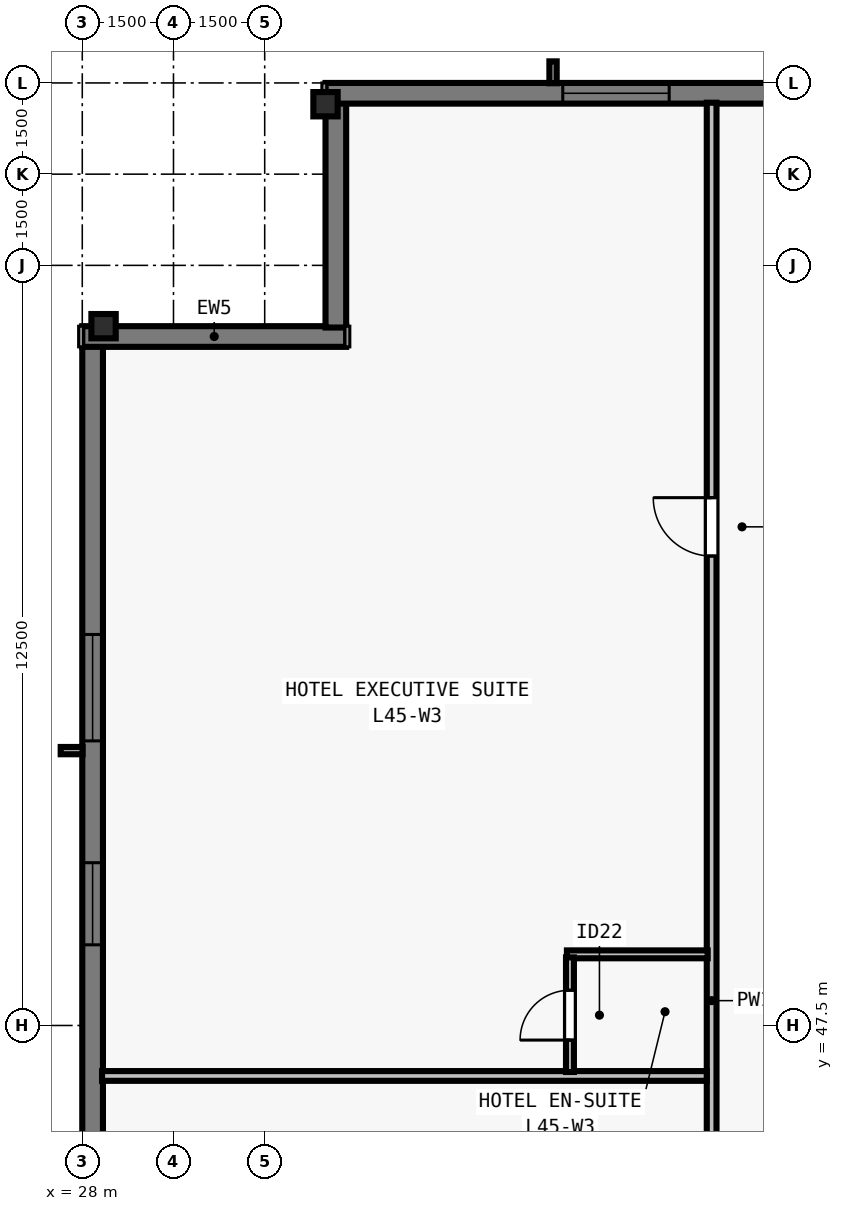
"""IFC4 building model, lengths in metres.
Left out: names, types, materials, properties, quantities, classifications, styles, units other than length and angle.
Written with IfcOpenShell. Run it as: python <this file> out.ifc"""

import sys

from ifc_helpers import new_model, si_unit, direction, frame, frame_2d, origin, origin_2d, place, context, subcontext, project, spatial, rectangle, i_section, extrude, element, fill, save


model = new_model("IFC4")
c1 = context("Model", 3, precision=1e-05, world=origin(), true_north=direction((0.0, 1.0)))
c2 = subcontext(c1, "Body", "Model", "MODEL_VIEW")
j1 = project(units=[si_unit("LENGTHUNIT", "METRE"), si_unit("PLANEANGLEUNIT", "RADIAN")], contexts=[c1])
p1 = place(None, origin())
s1 = spatial("IfcSite", under=j1, at=p1, CompositionType="ELEMENT")
p2 = place(p1, origin())
s2 = spatial("IfcBuilding", under=s1, at=p2, CompositionType="ELEMENT")
p3 = place(p2, frame((0.0, 0.0, 165.5)))
s3 = spatial("IfcBuildingStorey", under=s2, at=p3, CompositionType="ELEMENT", Elevation=165.5)
for number, where, z_axis, x_axis in (
    (1, (32.0, 62.65, 0.0), (0.0, 0.0, 1.0), (1.0, 0.0, 0.0)),
    (2, (28.35, 59.0, 0.0), (0.0, 0.0, 1.0), (0.0, 1.0, 0.0)),
):
    element("IfcColumn", number, at=place(p3, frame(where, z_axis=z_axis, x_axis=x_axis)), inside=s3, PredefinedType="COLUMN", context=c2, shape_type="SweptSolid", body=[
        extrude(i_section(OverallWidth=0.4, OverallDepth=0.4, WebThickness=0.022, FlangeThickness=0.036, at=origin_2d()), origin(), (0.0, 0.0, 1.0), 3.5),
    ])
p4 = place(p3, frame((28.17, 19.0, 0.0), z_axis=(0.0, 0.0, 1.0), x_axis=(0.0, 1.0, 0.0)))
e3 = element("IfcWall", 3, at=p4, inside=s3, PredefinedType="SOLIDWALL", context=c2, shape_type="SweptSolid", body=[
    extrude(rectangle(XDim=39.682, YDim=0.34, at=frame_2d((19.841, 0.0))), origin(), (0.0, 0.0, 1.0), 3.28),
])
p5 = place(p4, frame((4.752, 0.0, 0.8)))
e4 = element("IfcOpeningElement", 4, at=p5, cuts=e3, PredefinedType="OPENING", context=c2, shape_type="SweptSolid", body=[
    extrude(rectangle(XDim=1.75, YDim=1.66, at=frame_2d((0.875, 0.83))), frame((0.0, 0.18, 0.0), z_axis=(0.0, -1.0, 0.0), x_axis=(1.0, 0.0, 0.0)), (0.0, 0.0, 1.0), 0.36),
])
p6 = place(p4, frame((8.505, 0.0, 0.8)))
e5 = element("IfcOpeningElement", 5, at=p6, cuts=e3, PredefinedType="OPENING", context=c2, shape_type="SweptSolid", body=[
    extrude(rectangle(XDim=1.35, YDim=1.66, at=frame_2d((0.675, 0.83))), frame((0.0, 0.18, 0.0), z_axis=(0.0, -1.0, 0.0), x_axis=(1.0, 0.0, 0.0)), (0.0, 0.0, 1.0), 0.36),
])
p7 = place(p4, frame((16.062, 0.0, 0.8)))
e6 = element("IfcOpeningElement", 6, at=p7, cuts=e3, PredefinedType="OPENING", context=c2, shape_type="SweptSolid", body=[
    extrude(rectangle(XDim=1.35, YDim=1.66, at=frame_2d((0.675, 0.83))), frame((0.0, 0.18, 0.0), z_axis=(0.0, -1.0, 0.0), x_axis=(1.0, 0.0, 0.0)), (0.0, 0.0, 1.0), 0.36),
])
p8 = place(p4, frame((18.966, 0.0, 0.8)))
e7 = element("IfcOpeningElement", 7, at=p8, cuts=e3, PredefinedType="OPENING", context=c2, shape_type="SweptSolid", body=[
    extrude(rectangle(XDim=1.75, YDim=1.66, at=frame_2d((0.875, 0.83))), frame((0.0, 0.18, 0.0), z_axis=(0.0, -1.0, 0.0), x_axis=(1.0, 0.0, 0.0)), (0.0, 0.0, 1.0), 0.36),
])
p9 = place(p4, frame((22.719, 0.0, 0.8)))
e8 = element("IfcOpeningElement", 8, at=p9, cuts=e3, PredefinedType="OPENING", context=c2, shape_type="SweptSolid", body=[
    extrude(rectangle(XDim=1.35, YDim=1.66, at=frame_2d((0.675, 0.83))), frame((0.0, 0.18, 0.0), z_axis=(0.0, -1.0, 0.0), x_axis=(1.0, 0.0, 0.0)), (0.0, 0.0, 1.0), 0.36),
])
p10 = place(p4, frame((29.827, 0.0, 0.8)))
e9 = element("IfcOpeningElement", 9, at=p10, cuts=e3, PredefinedType="OPENING", context=c2, shape_type="SweptSolid", body=[
    extrude(rectangle(XDim=1.35, YDim=1.66, at=frame_2d((0.675, 0.83))), frame((0.0, 0.18, 0.0), z_axis=(0.0, -1.0, 0.0), x_axis=(1.0, 0.0, 0.0)), (0.0, 0.0, 1.0), 0.36),
])
p11 = place(p4, frame((33.18, 0.0, 0.8)))
e10 = element("IfcOpeningElement", 10, at=p11, cuts=e3, PredefinedType="OPENING", context=c2, shape_type="SweptSolid", body=[
    extrude(rectangle(XDim=1.75, YDim=1.66, at=frame_2d((0.875, 0.83))), frame((0.0, 0.18, 0.0), z_axis=(0.0, -1.0, 0.0), x_axis=(1.0, 0.0, 0.0)), (0.0, 0.0, 1.0), 0.36),
])
p12 = place(p3, frame((28.0, 58.83, 0.0), z_axis=(0.0, 0.0, 1.0), x_axis=(1.0, 0.0, 0.0)))
e11 = element("IfcWall", 11, at=p12, inside=s3, PredefinedType="SOLIDWALL", context=c2, shape_type="SweptSolid", body=[
    extrude(rectangle(XDim=4.34, YDim=0.34, at=frame_2d((2.17, 0.0))), origin(), (0.0, 0.0, 1.0), 3.28),
])
p13 = place(p3, frame((32.17, 58.978, 0.0), z_axis=(0.0, 0.0, 1.0), x_axis=(0.0, 1.0, 0.0)))
e12 = element("IfcWall", 12, at=p13, inside=s3, PredefinedType="SOLIDWALL", context=c2, shape_type="SweptSolid", body=[
    extrude(rectangle(XDim=3.704, YDim=0.34, at=frame_2d((1.852, 0.0))), origin(), (0.0, 0.0, 1.0), 3.28),
])
p14 = place(p3, frame((32.0, 62.83, 0.0), z_axis=(0.0, 0.0, 1.0), x_axis=(1.0, 0.0, 0.0)))
e13 = element("IfcWall", 13, at=p14, inside=s3, PredefinedType="SOLIDWALL", context=c2, shape_type="SweptSolid", body=[
    extrude(rectangle(XDim=39.682, YDim=0.34, at=frame_2d((19.841, 0.0))), origin(), (0.0, 0.0, 1.0), 3.28),
])
p15 = place(p14, frame((3.902, 0.0, 0.8)))
e14 = element("IfcOpeningElement", 14, at=p15, cuts=e13, PredefinedType="OPENING", context=c2, shape_type="SweptSolid", body=[
    extrude(rectangle(XDim=1.75, YDim=1.66, at=frame_2d((0.875, 0.83))), frame((0.0, 0.18, 0.0), z_axis=(0.0, -1.0, 0.0), x_axis=(1.0, 0.0, 0.0)), (0.0, 0.0, 1.0), 0.36),
])
p16 = place(p14, frame((8.955, 0.0, 0.8)))
e15 = element("IfcOpeningElement", 15, at=p16, cuts=e13, PredefinedType="OPENING", context=c2, shape_type="SweptSolid", body=[
    extrude(rectangle(XDim=1.35, YDim=1.66, at=frame_2d((0.675, 0.83))), frame((0.0, 0.18, 0.0), z_axis=(0.0, -1.0, 0.0), x_axis=(1.0, 0.0, 0.0)), (0.0, 0.0, 1.0), 0.36),
])
p17 = place(p14, frame((11.859, 0.0, 0.8)))
e16 = element("IfcOpeningElement", 16, at=p17, cuts=e13, PredefinedType="OPENING", context=c2, shape_type="SweptSolid", body=[
    extrude(rectangle(XDim=1.75, YDim=1.66, at=frame_2d((0.875, 0.83))), frame((0.0, 0.18, 0.0), z_axis=(0.0, -1.0, 0.0), x_axis=(1.0, 0.0, 0.0)), (0.0, 0.0, 1.0), 0.36),
])
p18 = place(p14, frame((16.062, 0.0, 0.8)))
e17 = element("IfcOpeningElement", 17, at=p18, cuts=e13, PredefinedType="OPENING", context=c2, shape_type="SweptSolid", body=[
    extrude(rectangle(XDim=1.35, YDim=1.66, at=frame_2d((0.675, 0.83))), frame((0.0, 0.18, 0.0), z_axis=(0.0, -1.0, 0.0), x_axis=(1.0, 0.0, 0.0)), (0.0, 0.0, 1.0), 0.36),
])
p19 = place(p14, frame((18.966, 0.0, 0.8)))
e18 = element("IfcOpeningElement", 18, at=p19, cuts=e13, PredefinedType="OPENING", context=c2, shape_type="SweptSolid", body=[
    extrude(rectangle(XDim=1.75, YDim=1.66, at=frame_2d((0.875, 0.83))), frame((0.0, 0.18, 0.0), z_axis=(0.0, -1.0, 0.0), x_axis=(1.0, 0.0, 0.0)), (0.0, 0.0, 1.0), 0.36),
])
p20 = place(p14, frame((22.719, 0.0, 0.8)))
e19 = element("IfcOpeningElement", 19, at=p20, cuts=e13, PredefinedType="OPENING", context=c2, shape_type="SweptSolid", body=[
    extrude(rectangle(XDim=1.35, YDim=1.66, at=frame_2d((0.675, 0.83))), frame((0.0, 0.18, 0.0), z_axis=(0.0, -1.0, 0.0), x_axis=(1.0, 0.0, 0.0)), (0.0, 0.0, 1.0), 0.36),
])
p21 = place(p14, frame((26.073, 0.0, 0.8)))
e20 = element("IfcOpeningElement", 20, at=p21, cuts=e13, PredefinedType="OPENING", context=c2, shape_type="SweptSolid", body=[
    extrude(rectangle(XDim=1.75, YDim=1.66, at=frame_2d((0.875, 0.83))), frame((0.0, 0.18, 0.0), z_axis=(0.0, -1.0, 0.0), x_axis=(1.0, 0.0, 0.0)), (0.0, 0.0, 1.0), 0.36),
])
p22 = place(p14, frame((28.977, 0.0, 0.8)))
e21 = element("IfcOpeningElement", 21, at=p22, cuts=e13, PredefinedType="OPENING", context=c2, shape_type="SweptSolid", body=[
    extrude(rectangle(XDim=1.35, YDim=1.66, at=frame_2d((0.675, 0.83))), frame((0.0, 0.18, 0.0), z_axis=(0.0, -1.0, 0.0), x_axis=(1.0, 0.0, 0.0)), (0.0, 0.0, 1.0), 0.36),
])
p23 = place(p14, frame((33.18, 0.0, 0.8)))
e22 = element("IfcOpeningElement", 22, at=p23, cuts=e13, PredefinedType="OPENING", context=c2, shape_type="SweptSolid", body=[
    extrude(rectangle(XDim=1.75, YDim=1.66, at=frame_2d((0.875, 0.83))), frame((0.0, 0.18, 0.0), z_axis=(0.0, -1.0, 0.0), x_axis=(1.0, 0.0, 0.0)), (0.0, 0.0, 1.0), 0.36),
])
p24 = place(p3, frame((38.35, 15.325, 0.0), z_axis=(0.0, 0.0, 1.0), x_axis=(0.0, 1.0, 0.0)))
e23 = element("IfcWall", 23, at=p24, inside=s3, PredefinedType="PARTITIONING", context=c2, shape_type="SweptSolid", body=[
    extrude(rectangle(XDim=47.35, YDim=0.16, at=frame_2d((23.675, 0.0))), origin(), (0.0, 0.0, 1.0), 2.555),
])
p25 = place(p24, frame((8.912, 0.0, 0.0)))
e24 = element("IfcOpeningElement", 24, at=p25, cuts=e23, PredefinedType="OPENING", context=c2, shape_type="SweptSolid", body=[
    extrude(rectangle(XDim=0.96, YDim=2.15, at=frame_2d((0.48, 1.075))), frame((0.0, 0.09, 0.0), z_axis=(0.0, -1.0, 0.0), x_axis=(1.0, 0.0, 0.0)), (0.0, 0.0, 1.0), 0.18),
])
p26 = place(p24, frame((24.312, 0.0, 0.0)))
e25 = element("IfcOpeningElement", 25, at=p26, cuts=e23, PredefinedType="OPENING", context=c2, shape_type="SweptSolid", body=[
    extrude(rectangle(XDim=0.96, YDim=2.15, at=frame_2d((0.48, 1.075))), frame((0.0, 0.09, 0.0), z_axis=(0.0, -1.0, 0.0), x_axis=(1.0, 0.0, 0.0)), (0.0, 0.0, 1.0), 0.18),
])
p27 = place(p24, frame((39.895, 0.0, 0.0)))
e26 = element("IfcOpeningElement", 26, at=p27, cuts=e23, PredefinedType="OPENING", context=c2, shape_type="SweptSolid", body=[
    extrude(rectangle(XDim=0.96, YDim=2.15, at=frame_2d((0.48, 1.075))), frame((0.0, 0.09, 0.0), z_axis=(0.0, -1.0, 0.0), x_axis=(1.0, 0.0, 0.0)), (0.0, 0.0, 1.0), 0.18),
])
p28 = place(p3, frame((28.325, 46.67, 0.0), z_axis=(0.0, 0.0, 1.0), x_axis=(1.0, 0.0, 0.0)))
e27 = element("IfcWall", 27, at=p28, inside=s3, PredefinedType="PARTITIONING", context=c2, shape_type="SweptSolid", body=[
    extrude(rectangle(XDim=9.945, YDim=0.16, at=frame_2d((4.973, 0.0))), origin(), (0.0, 0.0, 1.0), 3.28),
])
p29 = place(p3, frame((35.97, 48.67, 0.0), z_axis=(0.0, 0.0, 1.0), x_axis=(1.0, 0.0, 0.0)))
e28 = element("IfcWall", 28, at=p29, inside=s3, PredefinedType="PLUMBINGWALL", context=c2, shape_type="SweptSolid", body=[
    extrude(rectangle(XDim=2.315, YDim=0.13, at=frame_2d((1.157, 0.0))), origin(), (0.0, 0.0, 1.0), 3.28),
])
p30 = place(p3, frame((36.02, 46.735, 0.0), z_axis=(0.0, 0.0, 1.0), x_axis=(0.0, 1.0, 0.0)))
e29 = element("IfcWall", 29, at=p30, inside=s3, PredefinedType="PLUMBINGWALL", context=c2, shape_type="SweptSolid", body=[
    extrude(rectangle(XDim=1.885, YDim=0.13, at=frame_2d((0.942, 0.0))), origin(), (0.0, 0.0, 1.0), 3.28),
])
p31 = place(p30, frame((0.525, 0.0, 0.0)))
e30 = element("IfcOpeningElement", 30, at=p31, cuts=e29, PredefinedType="OPENING", context=c2, shape_type="SweptSolid", body=[
    extrude(rectangle(XDim=0.82, YDim=2.1, at=frame_2d((0.41, 1.05))), frame((0.0, 0.075, 0.0), z_axis=(0.0, -1.0, 0.0), x_axis=(1.0, 0.0, 0.0)), (0.0, 0.0, 1.0), 0.15),
])
p32 = place(p10, origin())
e31 = element("IfcWindow", 31, at=p32, inside=s3, PartitioningType="SINGLE_PANEL", PredefinedType="WINDOW", context=c2, shape_type="SweptSolid", body=[
    extrude(rectangle(XDim=1.35, YDim=1.66, at=frame_2d((0.675, 0.83))), frame((0.0, -0.05, 0.0), z_axis=(0.0, -1.0, 0.0), x_axis=(1.0, 0.0, 0.0)), (0.0, 0.0, 1.0), 0.06),
])
fill(e9, e31)
p33 = place(p11, origin())
e32 = element("IfcWindow", 32, at=p33, inside=s3, PartitioningType="SINGLE_PANEL", PredefinedType="WINDOW", context=c2, shape_type="SweptSolid", body=[
    extrude(rectangle(XDim=1.75, YDim=1.66, at=frame_2d((0.875, 0.83))), frame((0.0, -0.05, 0.0), z_axis=(0.0, -1.0, 0.0), x_axis=(1.0, 0.0, 0.0)), (0.0, 0.0, 1.0), 0.06),
])
fill(e10, e32)
p34 = place(p15, origin())
e33 = element("IfcWindow", 33, at=p34, inside=s3, PartitioningType="SINGLE_PANEL", PredefinedType="WINDOW", context=c2, shape_type="SweptSolid", body=[
    extrude(rectangle(XDim=1.75, YDim=1.66, at=frame_2d((0.875, 0.83))), frame((0.0, -0.05, 0.0), z_axis=(0.0, -1.0, 0.0), x_axis=(1.0, 0.0, 0.0)), (0.0, 0.0, 1.0), 0.06),
])
fill(e14, e33)
p35 = place(p31, origin())
e34 = element("IfcDoor", 34, at=p35, inside=s3, OperationType="SINGLE_SWING_LEFT", PredefinedType="DOOR", context=c2, shape_type="SweptSolid", body=[
    extrude(rectangle(XDim=0.82, YDim=2.1, at=frame_2d((0.41, 1.05))), frame((0.0, 0.025, 0.0), z_axis=(0.0, -1.0, 0.0), x_axis=(1.0, 0.0, 0.0)), (0.0, 0.0, 1.0), 0.05),
])
fill(e30, e34)
p36 = place(p27, origin())
e35 = element("IfcDoor", 35, at=p36, inside=s3, OperationType="SINGLE_SWING_RIGHT", PredefinedType="DOOR", context=c2, shape_type="SweptSolid", body=[
    extrude(rectangle(XDim=0.96, YDim=2.15, at=frame_2d((0.48, 1.075))), frame((0.0, 0.025, 0.0), z_axis=(0.0, -1.0, 0.0), x_axis=(1.0, 0.0, 0.0)), (0.0, 0.0, 1.0), 0.05),
])
fill(e26, e35)
save(model, sys.argv[1])
